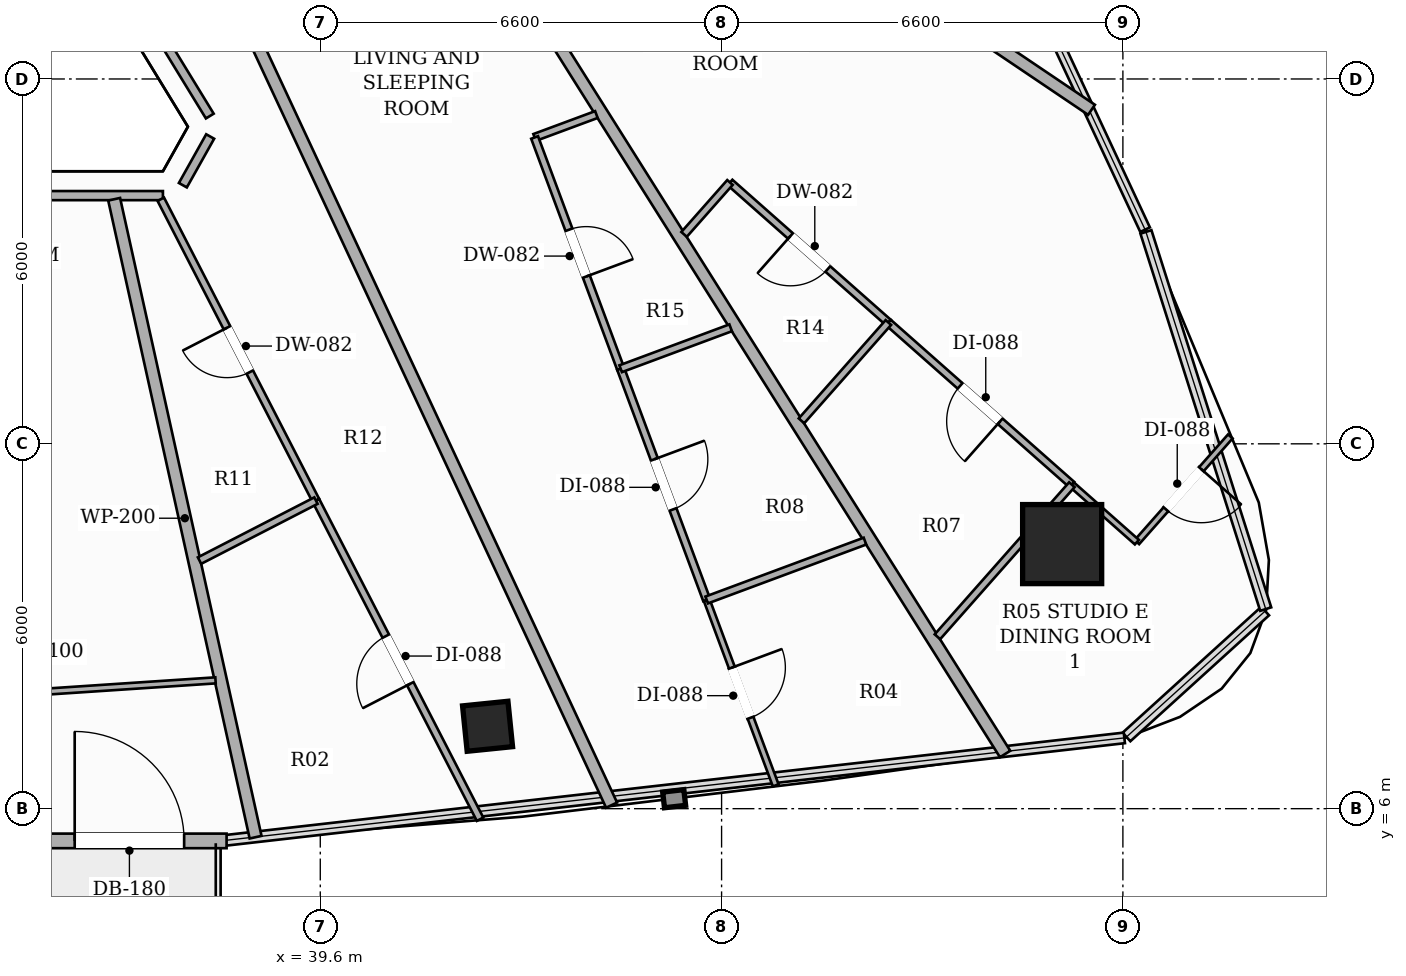
"""IFC4 building model, lengths in metres.
Left out: names, types, materials, properties, quantities, classifications, styles, units other than length and angle.
Written with IfcOpenShell. Run it as: python <this file> out.ifc"""

import sys

from ifc_helpers import new_model, si_unit, direction, frame, frame_2d, origin, origin_2d, place, context, subcontext, project, spatial, rectangle, hollow_rectangle, extrude, element, fill, save


model = new_model("IFC4")
c1 = context("Model", 3, precision=1e-05, world=origin(), true_north=direction((0.0, 1.0)))
c2 = subcontext(c1, "Body", "Model", "MODEL_VIEW")
j1 = project(units=[si_unit("LENGTHUNIT", "METRE"), si_unit("PLANEANGLEUNIT", "RADIAN")], contexts=[c1])
p1 = place(None, origin())
s1 = spatial("IfcSite", under=j1, at=p1, CompositionType="ELEMENT")
p2 = place(p1, origin())
s2 = spatial("IfcBuilding", under=s1, at=p2, CompositionType="ELEMENT")
p3 = place(p2, frame((0.0, 0.0, 253.55)))
s3 = spatial("IfcBuildingStorey", under=s2, at=p3, CompositionType="ELEMENT", Elevation=253.55)
p4 = place(p3, frame((51.801, 10.351, 0.0), z_axis=(0.0, 0.0, 1.0), x_axis=(1.0, 0.0, 0.0)))
e1 = element("IfcColumn", 1, at=p4, inside=s3, PredefinedType="COLUMN", context=c2, shape_type="SweptSolid", body=[
    extrude(hollow_rectangle(XDim=1.3, YDim=1.3, WallThickness=0.04, at=origin_2d()), origin(), (0.0, 0.0, 1.0), 3.3),
])
p5 = place(p3, frame((42.351, 7.355, 0.0), z_axis=(0.0, 0.0, 1.0), x_axis=(0.994880708829, 0.101056297183, 0.0)))
e2 = element("IfcColumn", 2, at=p5, inside=s3, PredefinedType="COLUMN", context=c2, shape_type="SweptSolid", body=[
    extrude(hollow_rectangle(XDim=0.75, YDim=0.75, WallThickness=0.025, at=origin_2d()), origin(), (0.0, 0.0, 1.0), 3.3),
])
p6 = place(p3, frame((27.941, 5.47, 0.0), z_axis=(0.0, 0.0, 1.0), x_axis=(1.0, 0.0, 0.0)))
e3 = element("IfcWall", 3, at=p6, inside=s3, PredefinedType="SOLIDWALL", context=c2, shape_type="SweptSolid", body=[
    extrude(rectangle(XDim=10.118, YDim=0.24, at=frame_2d((5.059, 0.0))), origin(), (0.0, 0.0, 1.0), 2.464),
])
p7 = place(p6, frame((7.62, 0.0, 0.0)))
e4 = element("IfcOpeningElement", 4, at=p7, cuts=e3, PredefinedType="OPENING", context=c2, shape_type="SweptSolid", body=[
    extrude(rectangle(XDim=1.8, YDim=2.2, at=frame_2d((0.9, 1.1))), frame((0.0, 0.13, 0.0), z_axis=(0.0, -1.0, 0.0), x_axis=(1.0, 0.0, 0.0)), (0.0, 0.0, 1.0), 0.26),
])
p8 = place(p3, frame((33.866, 23.79, 0.0), z_axis=(0.0, 0.0, 1.0), x_axis=(0.522011859837, -0.852938226479, 0.0)))
e5 = element("IfcWall", 5, at=p8, inside=s3, PredefinedType="PARTITIONING", context=c2, shape_type="SweptSolid", body=[
    extrude(rectangle(XDim=7.504, YDim=0.15, at=frame_2d((3.752, 0.0))), origin(), (0.0, 0.0, 1.0), 2.613),
])
p9 = place(p3, frame((37.789, 17.054, 0.0), z_axis=(0.0, 0.0, 1.0), x_axis=(-0.488935266506, -0.872320070368, 0.0)))
e6 = element("IfcWall", 6, at=p9, inside=s3, PredefinedType="PARTITIONING", context=c2, shape_type="SweptSolid", body=[
    extrude(rectangle(XDim=0.918, YDim=0.15, at=frame_2d((0.459, 0.0))), origin(), (0.0, 0.0, 1.0), 2.9),
])
p10 = place(p3, frame((37.012, 16.082, 0.0), z_axis=(0.0, 0.0, 1.0), x_axis=(-1.0, 0.0, 0.0)))
e7 = element("IfcWall", 7, at=p10, inside=s3, PredefinedType="PARTITIONING", context=c2, shape_type="SweptSolid", body=[
    extrude(rectangle(XDim=8.024, YDim=0.15, at=frame_2d((4.012, 0.0))), origin(), (0.0, 0.0, 1.0), 2.613),
])
p11 = place(p3, frame((36.21, 16.022, 0.0), z_axis=(0.0, 0.0, 1.0), x_axis=(0.216451711791, -0.976293325012, 0.0)))
e8 = element("IfcWall", 8, at=p11, inside=s3, PredefinedType="PARTITIONING", context=c2, shape_type="SweptSolid", body=[
    extrude(rectangle(XDim=10.746, YDim=0.2, at=frame_2d((5.373, 0.0))), origin(), (0.0, 0.0, 1.0), 2.332),
])
p12 = place(p3, frame((52.284, 17.493, 0.0), z_axis=(0.0, 0.0, 1.0), x_axis=(-0.829053532208, 0.559169241584, 0.0)))
e9 = element("IfcWall", 9, at=p12, inside=s3, PredefinedType="PARTITIONING", context=c2, shape_type="SweptSolid", body=[
    extrude(rectangle(XDim=12.031, YDim=0.2, at=frame_2d((6.015, 0.0))), origin(), (0.0, 0.0, 1.0), 2.332),
])
p13 = place(p3, frame((50.863, 6.899, 0.0), z_axis=(0.0, 0.0, 1.0), x_axis=(-0.532843438342, 0.846213844259, 0.0)))
e10 = element("IfcWall", 10, at=p13, inside=s3, PredefinedType="PARTITIONING", context=c2, shape_type="SweptSolid", body=[
    extrude(rectangle(XDim=19.961, YDim=0.2, at=frame_2d((9.98, 0.0))), origin(), (0.0, 0.0, 1.0), 2.332),
])
p14 = place(p3, frame((44.391, 6.058, 0.0), z_axis=(0.0, 0.0, 1.0), x_axis=(-0.422434507673, 0.906393450289, 0.0)))
e11 = element("IfcWall", 11, at=p14, inside=s3, PredefinedType="PARTITIONING", context=c2, shape_type="SweptSolid", body=[
    extrude(rectangle(XDim=19.563, YDim=0.2, at=frame_2d((9.782, 0.0))), origin(), (0.0, 0.0, 1.0), 2.332),
])
p15 = place(p3, frame((37.877, 8.11, 0.0), z_axis=(0.0, 0.0, 1.0), x_axis=(-0.997794804299, -0.066374155471, 0.0)))
e12 = element("IfcWall", 12, at=p15, inside=s3, PredefinedType="PARTITIONING", context=c2, shape_type="SweptSolid", body=[
    extrude(rectangle(XDim=10.851, YDim=0.1, at=frame_2d((5.425, 0.0))), origin(), (0.0, 0.0, 1.0), 2.332),
])
p16 = place(p15, frame((5.68, 0.0, 0.0)))
e13 = element("IfcOpeningElement", 13, at=p16, cuts=e12, PredefinedType="OPENING", context=c2, shape_type="SweptSolid", body=[
    extrude(rectangle(XDim=0.88, YDim=2.1, at=frame_2d((0.44, 1.05))), frame((0.0, 0.06, 0.0), z_axis=(0.0, -1.0, 0.0), x_axis=(1.0, 0.0, 0.0)), (0.0, 0.0, 1.0), 0.12),
])
p17 = place(p3, frame((48.943, 13.995, 0.0), z_axis=(0.0, 0.0, 1.0), x_axis=(-0.749231040751, 0.662308725275, 0.0)))
e14 = element("IfcWall", 14, at=p17, inside=s3, PredefinedType="PARTITIONING", context=c2, shape_type="SweptSolid", body=[
    extrude(rectangle(XDim=3.477, YDim=0.12, at=frame_2d((1.739, 0.0))), origin(), (0.0, 0.0, 1.0), 2.405),
])
p18 = place(p17, frame((1.329, 0.0, 0.0)))
e15 = element("IfcOpeningElement", 15, at=p18, cuts=e14, PredefinedType="OPENING", context=c2, shape_type="SweptSolid", body=[
    extrude(rectangle(XDim=0.82, YDim=2.1, at=frame_2d((0.41, 1.05))), frame((0.0, 0.07, 0.0), z_axis=(0.0, -1.0, 0.0), x_axis=(1.0, 0.0, 0.0)), (0.0, 0.0, 1.0), 0.14),
])
p19 = place(p3, frame((46.338, 16.298, 0.0), z_axis=(0.0, 0.0, 1.0), x_axis=(-0.662287293934, -0.749249985181, 0.0)))
e16 = element("IfcWall", 16, at=p19, inside=s3, PredefinedType="PARTITIONING", context=c2, shape_type="SweptSolid", body=[
    extrude(rectangle(XDim=1.14, YDim=0.12, at=frame_2d((0.57, 0.0))), origin(), (0.0, 0.0, 1.0), 2.9),
])
p20 = place(p3, frame((51.961, 11.328, 0.0), z_axis=(0.0, 0.0, 1.0), x_axis=(-0.749289212621, 0.662242913024, 0.0)))
e17 = element("IfcWall", 17, at=p20, inside=s3, PredefinedType="PARTITIONING", context=c2, shape_type="SweptSolid", body=[
    extrude(rectangle(XDim=4.028, YDim=0.12, at=frame_2d((2.014, 0.0))), origin(), (0.0, 0.0, 1.0), 2.332),
])
p21 = place(p20, frame((1.574, 0.0, 0.0)))
e18 = element("IfcOpeningElement", 18, at=p21, cuts=e17, PredefinedType="OPENING", context=c2, shape_type="SweptSolid", body=[
    extrude(rectangle(XDim=0.88, YDim=2.1, at=frame_2d((0.44, 1.05))), frame((0.0, 0.07, 0.0), z_axis=(0.0, -1.0, 0.0), x_axis=(1.0, 0.0, 0.0)), (0.0, 0.0, 1.0), 0.14),
])
p22 = place(p3, frame((54.567, 12.122, 0.0), z_axis=(0.0, 0.0, 1.0), x_axis=(-0.662212906575, -0.749315732095, 0.0)))
e19 = element("IfcWall", 19, at=p22, inside=s3, PredefinedType="PARTITIONING", context=c2, shape_type="SweptSolid", body=[
    extrude(rectangle(XDim=2.321, YDim=0.1, at=frame_2d((1.16, 0.0))), origin(), (0.0, 0.0, 1.0), 2.9),
])
p23 = place(p22, frame((0.72, 0.0, 0.0)))
e20 = element("IfcOpeningElement", 20, at=p23, cuts=e19, PredefinedType="OPENING", context=c2, shape_type="SweptSolid", body=[
    extrude(rectangle(XDim=0.88, YDim=2.1, at=frame_2d((0.44, 1.05))), frame((0.0, 0.06, 0.0), z_axis=(0.0, -1.0, 0.0), x_axis=(1.0, 0.0, 0.0)), (0.0, 0.0, 1.0), 0.12),
])
p24 = place(p3, frame((53.03, 10.383, 0.0), z_axis=(0.0, 0.0, 1.0), x_axis=(-0.749313288423, 0.66221567166, 0.0)))
e21 = element("IfcWall", 21, at=p24, inside=s3, PredefinedType="PARTITIONING", context=c2, shape_type="SweptSolid", body=[
    extrude(rectangle(XDim=1.427, YDim=0.1, at=frame_2d((0.713, 0.0))), origin(), (0.0, 0.0, 1.0), 2.332),
])
p25 = place(p3, frame((48.943, 13.995, 0.0), z_axis=(0.0, 0.0, 1.0), x_axis=(-0.662212567735, -0.749316031547, 0.0)))
e22 = element("IfcWall", 22, at=p25, inside=s3, PredefinedType="PARTITIONING", context=c2, shape_type="SweptSolid", body=[
    extrude(rectangle(XDim=2.158, YDim=0.12, at=frame_2d((1.079, 0.0))), origin(), (0.0, 0.0, 1.0), 2.405),
])
p26 = place(p3, frame((51.961, 11.328, 0.0), z_axis=(0.0, 0.0, 1.0), x_axis=(-0.662327669466, -0.74921429395, 0.0)))
e23 = element("IfcWall", 23, at=p26, inside=s3, PredefinedType="PARTITIONING", context=c2, shape_type="SweptSolid", body=[
    extrude(rectangle(XDim=3.338, YDim=0.12, at=frame_2d((1.669, 0.0))), origin(), (0.0, 0.0, 1.0), 2.332),
])
p27 = place(p3, frame((44.141, 17.415, 0.0), z_axis=(0.0, 0.0, 1.0), x_axis=(-0.937563848777, -0.347813210599, 0.0)))
e24 = element("IfcWall", 24, at=p27, inside=s3, PredefinedType="PARTITIONING", context=c2, shape_type="SweptSolid", body=[
    extrude(rectangle(XDim=1.084, YDim=0.12, at=frame_2d((0.542, 0.0))), origin(), (0.0, 0.0, 1.0), 2.613),
])
p28 = place(p3, frame((43.125, 17.038, 0.0), z_axis=(0.0, 0.0, 1.0), x_axis=(0.348728795746, -0.937223680355, 0.0)))
e25 = element("IfcWall", 25, at=p28, inside=s3, PredefinedType="PARTITIONING", context=c2, shape_type="SweptSolid", body=[
    extrude(rectangle(XDim=4.058, YDim=0.12, at=frame_2d((2.029, 0.0))), origin(), (0.0, 0.0, 1.0), 2.613),
])
p29 = place(p28, frame((1.619, 0.0, 0.0)))
e26 = element("IfcOpeningElement", 26, at=p29, cuts=e25, PredefinedType="OPENING", context=c2, shape_type="SweptSolid", body=[
    extrude(rectangle(XDim=0.82, YDim=2.1, at=frame_2d((0.41, 1.05))), frame((0.0, 0.07, 0.0), z_axis=(0.0, -1.0, 0.0), x_axis=(1.0, 0.0, 0.0)), (0.0, 0.0, 1.0), 0.14),
])
p30 = place(p3, frame((44.54, 13.235, 0.0), z_axis=(0.0, 0.0, 1.0), x_axis=(0.348709131935, -0.937230996769, 0.0)))
e27 = element("IfcWall", 27, at=p30, inside=s3, PredefinedType="PARTITIONING", context=c2, shape_type="SweptSolid", body=[
    extrude(rectangle(XDim=4.058, YDim=0.12, at=frame_2d((2.029, 0.0))), origin(), (0.0, 0.0, 1.0), 2.9),
])
p31 = place(p30, frame((1.589, 0.0, 0.0)))
e28 = element("IfcOpeningElement", 28, at=p31, cuts=e27, PredefinedType="OPENING", context=c2, shape_type="SweptSolid", body=[
    extrude(rectangle(XDim=0.88, YDim=2.1, at=frame_2d((0.44, 1.05))), frame((0.0, 0.07, 0.0), z_axis=(0.0, -1.0, 0.0), x_axis=(1.0, 0.0, 0.0)), (0.0, 0.0, 1.0), 0.14),
])
p32 = place(p3, frame((45.955, 9.432, 0.0), z_axis=(0.0, 0.0, 1.0), x_axis=(0.34888547359, -0.937165367647, 0.0)))
e29 = element("IfcWall", 29, at=p32, inside=s3, PredefinedType="PARTITIONING", context=c2, shape_type="SweptSolid", body=[
    extrude(rectangle(XDim=3.253, YDim=0.1, at=frame_2d((1.626, 0.0))), origin(), (0.0, 0.0, 1.0), 2.332),
])
p33 = place(p32, frame((1.187, 0.0, 0.0)))
e30 = element("IfcOpeningElement", 30, at=p33, cuts=e29, PredefinedType="OPENING", context=c2, shape_type="SweptSolid", body=[
    extrude(rectangle(XDim=0.88, YDim=2.1, at=frame_2d((0.44, 1.05))), frame((0.0, 0.06, 0.0), z_axis=(0.0, -1.0, 0.0), x_axis=(1.0, 0.0, 0.0)), (0.0, 0.0, 1.0), 0.12),
])
p34 = place(p3, frame((46.349, 13.908, 0.0), z_axis=(0.0, 0.0, 1.0), x_axis=(-0.937271835507, -0.348599349347, 0.0)))
e31 = element("IfcWall", 31, at=p34, inside=s3, PredefinedType="PARTITIONING", context=c2, shape_type="SweptSolid", body=[
    extrude(rectangle(XDim=1.93, YDim=0.12, at=frame_2d((0.965, 0.0))), origin(), (0.0, 0.0, 1.0), 2.613),
])
p35 = place(p3, frame((48.558, 10.4, 0.0), z_axis=(0.0, 0.0, 1.0), x_axis=(-0.937286649549, -0.34855951655, 0.0)))
e32 = element("IfcWall", 32, at=p35, inside=s3, PredefinedType="PARTITIONING", context=c2, shape_type="SweptSolid", body=[
    extrude(rectangle(XDim=2.777, YDim=0.12, at=frame_2d((1.389, 0.0))), origin(), (0.0, 0.0, 1.0), 2.613),
])
p36 = place(p3, frame((39.529, 11.066, 0.0), z_axis=(0.0, 0.0, 1.0), x_axis=(-0.457798211716, 0.889056127221, 0.0)))
e33 = element("IfcWall", 33, at=p36, inside=s3, PredefinedType="PARTITIONING", context=c2, shape_type="SweptSolid", body=[
    extrude(rectangle(XDim=5.574, YDim=0.12, at=frame_2d((2.787, 0.0))), origin(), (0.0, 0.0, 1.0), 2.613),
])
p37 = place(p36, frame((2.377, 0.0, 0.0)))
e34 = element("IfcOpeningElement", 34, at=p37, cuts=e33, PredefinedType="OPENING", context=c2, shape_type="SweptSolid", body=[
    extrude(rectangle(XDim=0.82, YDim=2.1, at=frame_2d((0.41, 1.05))), frame((0.0, 0.07, 0.0), z_axis=(0.0, -1.0, 0.0), x_axis=(1.0, 0.0, 0.0)), (0.0, 0.0, 1.0), 0.14),
])
p38 = place(p3, frame((42.228, 5.826, 0.0), z_axis=(0.0, 0.0, 1.0), x_axis=(-0.457901041138, 0.889003170143, 0.0)))
e35 = element("IfcWall", 35, at=p38, inside=s3, PredefinedType="PARTITIONING", context=c2, shape_type="SweptSolid", body=[
    extrude(rectangle(XDim=5.894, YDim=0.12, at=frame_2d((2.947, 0.0))), origin(), (0.0, 0.0, 1.0), 2.332),
])
p39 = place(p38, frame((2.507, 0.0, 0.0)))
e36 = element("IfcOpeningElement", 36, at=p39, cuts=e35, PredefinedType="OPENING", context=c2, shape_type="SweptSolid", body=[
    extrude(rectangle(XDim=0.88, YDim=2.1, at=frame_2d((0.44, 1.05))), frame((0.0, 0.07, 0.0), z_axis=(0.0, -1.0, 0.0), x_axis=(1.0, 0.0, 0.0)), (0.0, 0.0, 1.0), 0.14),
])
p40 = place(p3, frame((39.529, 11.066, 0.0), z_axis=(0.0, 0.0, 1.0), x_axis=(-0.889105964634, -0.457701413207, 0.0)))
e37 = element("IfcWall", 37, at=p40, inside=s3, PredefinedType="PARTITIONING", context=c2, shape_type="SweptSolid", body=[
    extrude(rectangle(XDim=2.154, YDim=0.12, at=frame_2d((1.077, 0.0))), origin(), (0.0, 0.0, 1.0), 2.613),
])
p41 = place(p7, origin())
e38 = element("IfcDoor", 38, at=p41, inside=s3, OperationType="SINGLE_SWING_LEFT", PredefinedType="DOOR", context=c2, shape_type="SweptSolid", body=[
    extrude(rectangle(XDim=1.8, YDim=2.2, at=frame_2d((0.9, 1.1))), frame((0.0, 0.025, 0.0), z_axis=(0.0, -1.0, 0.0), x_axis=(1.0, 0.0, 0.0)), (0.0, 0.0, 1.0), 0.05),
])
fill(e4, e38)
p42 = place(p18, origin())
e39 = element("IfcDoor", 39, at=p42, inside=s3, OperationType="SINGLE_SWING_RIGHT", PredefinedType="DOOR", context=c2, shape_type="SweptSolid", body=[
    extrude(rectangle(XDim=0.82, YDim=2.1, at=frame_2d((0.41, 1.05))), frame((0.0, 0.025, 0.0), z_axis=(0.0, -1.0, 0.0), x_axis=(1.0, 0.0, 0.0)), (0.0, 0.0, 1.0), 0.05),
])
fill(e15, e39)
p43 = place(p21, origin())
e40 = element("IfcDoor", 40, at=p43, inside=s3, OperationType="SINGLE_SWING_LEFT", PredefinedType="DOOR", context=c2, shape_type="SweptSolid", body=[
    extrude(rectangle(XDim=0.88, YDim=2.1, at=frame_2d((0.44, 1.05))), frame((0.0, 0.025, 0.0), z_axis=(0.0, -1.0, 0.0), x_axis=(1.0, 0.0, 0.0)), (0.0, 0.0, 1.0), 0.05),
])
fill(e18, e40)
p44 = place(p23, origin())
e41 = element("IfcDoor", 41, at=p44, inside=s3, OperationType="SINGLE_SWING_LEFT", PredefinedType="DOOR", context=c2, shape_type="SweptSolid", body=[
    extrude(rectangle(XDim=0.88, YDim=2.1, at=frame_2d((0.44, 1.05))), frame((0.0, 0.025, 0.0), z_axis=(0.0, -1.0, 0.0), x_axis=(1.0, 0.0, 0.0)), (0.0, 0.0, 1.0), 0.05),
])
fill(e20, e41)
p45 = place(p29, origin())
e42 = element("IfcDoor", 42, at=p45, inside=s3, OperationType="SINGLE_SWING_RIGHT", PredefinedType="DOOR", context=c2, shape_type="SweptSolid", body=[
    extrude(rectangle(XDim=0.82, YDim=2.1, at=frame_2d((0.41, 1.05))), frame((0.0, 0.025, 0.0), z_axis=(0.0, -1.0, 0.0), x_axis=(1.0, 0.0, 0.0)), (0.0, 0.0, 1.0), 0.05),
])
fill(e26, e42)
p46 = place(p31, origin())
e43 = element("IfcDoor", 43, at=p46, inside=s3, OperationType="SINGLE_SWING_LEFT", PredefinedType="DOOR", context=c2, shape_type="SweptSolid", body=[
    extrude(rectangle(XDim=0.88, YDim=2.1, at=frame_2d((0.44, 1.05))), frame((0.0, 0.025, 0.0), z_axis=(0.0, -1.0, 0.0), x_axis=(1.0, 0.0, 0.0)), (0.0, 0.0, 1.0), 0.05),
])
fill(e28, e43)
p47 = place(p33, origin())
e44 = element("IfcDoor", 44, at=p47, inside=s3, OperationType="SINGLE_SWING_LEFT", PredefinedType="DOOR", context=c2, shape_type="SweptSolid", body=[
    extrude(rectangle(XDim=0.88, YDim=2.1, at=frame_2d((0.44, 1.05))), frame((0.0, 0.025, 0.0), z_axis=(0.0, -1.0, 0.0), x_axis=(1.0, 0.0, 0.0)), (0.0, 0.0, 1.0), 0.05),
])
fill(e30, e44)
p48 = place(p37, origin())
e45 = element("IfcDoor", 45, at=p48, inside=s3, OperationType="SINGLE_SWING_RIGHT", PredefinedType="DOOR", context=c2, shape_type="SweptSolid", body=[
    extrude(rectangle(XDim=0.82, YDim=2.1, at=frame_2d((0.41, 1.05))), frame((0.0, 0.025, 0.0), z_axis=(0.0, -1.0, 0.0), x_axis=(1.0, 0.0, 0.0)), (0.0, 0.0, 1.0), 0.05),
])
fill(e34, e45)
p49 = place(p39, origin())
e46 = element("IfcDoor", 46, at=p49, inside=s3, OperationType="SINGLE_SWING_LEFT", PredefinedType="DOOR", context=c2, shape_type="SweptSolid", body=[
    extrude(rectangle(XDim=0.88, YDim=2.1, at=frame_2d((0.44, 1.05))), frame((0.0, 0.025, 0.0), z_axis=(0.0, -1.0, 0.0), x_axis=(1.0, 0.0, 0.0)), (0.0, 0.0, 1.0), 0.05),
])
fill(e36, e46)
save(model, sys.argv[1])
